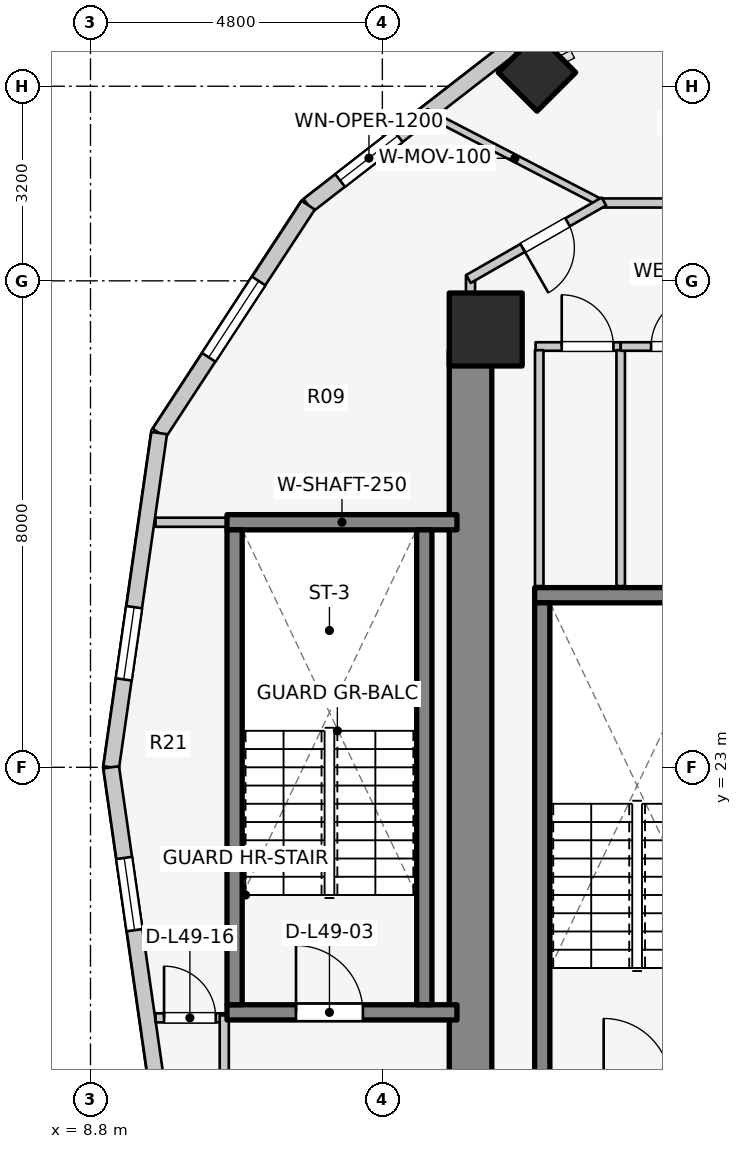
"""IFC4 building model, lengths in metres.
Left out: names, types, materials, properties, quantities, classifications, styles, units other than length and angle.
Written with IfcOpenShell. Run it as: python <this file> out.ifc"""

import sys

from ifc_helpers import new_model, si_unit, direction, frame, frame_2d, origin, origin_2d, place, context, subcontext, project, spatial, rectangle, extrude, element, fill, save


model = new_model("IFC4")
c1 = context("Model", 3, precision=1e-05, world=origin(), true_north=direction((0.0, 1.0)))
c2 = subcontext(c1, "Body", "Model", "MODEL_VIEW")
j1 = project(units=[si_unit("LENGTHUNIT", "METRE"), si_unit("PLANEANGLEUNIT", "RADIAN")], contexts=[c1])
p1 = place(None, origin())
s1 = spatial("IfcSite", under=j1, at=p1, CompositionType="ELEMENT")
p2 = place(p1, origin())
s2 = spatial("IfcBuilding", under=s1, at=p2, CompositionType="ELEMENT")
p3 = place(p2, frame((0.0, 0.0, 162.2)))
s3 = spatial("IfcBuildingStorey", under=s2, at=p3, CompositionType="ELEMENT", Elevation=162.2)
p4 = place(p3, frame((15.05, 17.05, 0.0), z_axis=(0.0, 0.0, 1.0), x_axis=(0.0, 1.0, 0.0)))
e1 = element("IfcWall", 1, at=p4, inside=s3, PredefinedType="SHEAR", context=c2, shape_type="SweptSolid", body=[
    extrude(rectangle(XDim=12.8, YDim=0.7, at=frame_2d((6.4, 0.0))), origin(), (0.0, 0.0, 1.0), 3.1),
])
p5 = place(p3, frame((16.105, 25.83, 0.0), z_axis=(0.0, 0.0, 1.0), x_axis=(1.0, 0.0, 0.0)))
e2 = element("IfcWall", 2, at=p5, inside=s3, PredefinedType="SOLIDWALL", context=c2, shape_type="SweptSolid", body=[
    extrude(rectangle(XDim=3.37, YDim=0.25, at=frame_2d((1.685, 0.0))), origin(), (0.0, 0.0, 1.0), 3.1),
])
p6 = place(p3, frame((16.23, 17.895, 0.0), z_axis=(0.0, 0.0, 1.0), x_axis=(0.0, 1.0, 0.0)))
e3 = element("IfcWall", 3, at=p6, inside=s3, PredefinedType="SOLIDWALL", context=c2, shape_type="SweptSolid", body=[
    extrude(rectangle(XDim=7.81, YDim=0.25, at=frame_2d((3.905, 0.0))), origin(), (0.0, 0.0, 1.0), 3.1),
])
p7 = place(p3, frame((11.045, 18.97, 0.0), z_axis=(0.0, 0.0, 1.0), x_axis=(1.0, 0.0, 0.0)))
e4 = element("IfcWall", 4, at=p7, inside=s3, PredefinedType="SOLIDWALL", context=c2, shape_type="SweptSolid", body=[
    extrude(rectangle(XDim=3.782, YDim=0.25, at=frame_2d((1.891, 0.0))), origin(), (0.0, 0.0, 1.0), 3.1),
])
p8 = place(p7, frame((1.135, 0.0, 0.0)))
e5 = element("IfcOpeningElement", 5, at=p8, cuts=e4, PredefinedType="OPENING", context=c2, shape_type="SweptSolid", body=[
    extrude(rectangle(XDim=1.1, YDim=2.1, at=frame_2d((0.55, 1.05))), frame((0.0, 0.135, 0.0), z_axis=(0.0, -1.0, 0.0), x_axis=(1.0, 0.0, 0.0)), (0.0, 0.0, 1.0), 0.27),
])
p9 = place(p3, frame((11.045, 27.03, 0.0), z_axis=(0.0, 0.0, 1.0), x_axis=(1.0, 0.0, 0.0)))
e6 = element("IfcWall", 6, at=p9, inside=s3, PredefinedType="SOLIDWALL", context=c2, shape_type="SweptSolid", body=[
    extrude(rectangle(XDim=3.782, YDim=0.25, at=frame_2d((1.891, 0.0))), origin(), (0.0, 0.0, 1.0), 3.1),
])
for number, where, z_axis, x_axis in (
    (7, (11.17, 19.095, 0.0), (0.0, 0.0, 1.0), (0.0, 1.0, 0.0)),
    (8, (14.29, 19.095, 0.0), (0.0, 0.0, 1.0), (0.0, 1.0, 0.0)),
):
    element("IfcWall", number, at=place(p3, frame(where, z_axis=z_axis, x_axis=x_axis)), inside=s3, PredefinedType="SOLIDWALL", context=c2, shape_type="SweptSolid", body=[
        extrude(rectangle(XDim=7.81, YDim=0.25, at=frame_2d((3.905, 0.0))), origin(), (0.0, 0.0, 1.0), 3.1),
    ])
p10 = place(p3, frame((15.3, 30.2, 0.0), z_axis=(0.0, 0.0, 1.0), x_axis=(1.0, 0.0, 0.0)))
e9 = element("IfcColumn", 9, at=p10, inside=s3, PredefinedType="COLUMN", context=c2, shape_type="SweptSolid", body=[
    extrude(rectangle(XDim=1.2, YDim=1.2, at=origin_2d()), origin(), (0.0, 0.0, 1.0), 3.1),
])
p11 = place(p3, frame((16.143, 34.427, 0.0), z_axis=(0.0, 0.0, 1.0), x_axis=(-0.707106781187, 0.707106781187, 0.0)))
e10 = element("IfcColumn", 10, at=p11, inside=s3, PredefinedType="COLUMN", context=c2, shape_type="SweptSolid", body=[
    extrude(rectangle(XDim=0.9, YDim=0.9, at=origin_2d()), origin(), (0.0, 0.0, 1.0), 3.1),
])
p12 = place(p3, frame((19.587, 36.863, 0.0), z_axis=(0.0, 0.0, 1.0), x_axis=(-0.885660265226, -0.464333818065, 0.0)))
e11 = element("IfcWall", 11, at=p12, inside=s3, PredefinedType="STANDARD", context=c2, shape_type="SweptSolid", body=[
    extrude(rectangle(XDim=4.354, YDim=0.26, at=frame_2d((2.177, 0.0))), origin(), (0.0, 0.0, 1.0), 2.85),
])
p13 = place(p3, frame((15.731, 34.842, 0.0), z_axis=(0.0, 0.0, 1.0), x_axis=(-0.790185650662, -0.612867552973, 0.0)))
e12 = element("IfcWall", 12, at=p13, inside=s3, PredefinedType="STANDARD", context=c2, shape_type="SweptSolid", body=[
    extrude(rectangle(XDim=4.239, YDim=0.26, at=frame_2d((2.12, 0.0))), origin(), (0.0, 0.0, 1.0), 2.85),
])
p14 = place(p13, frame((2.375, 0.0, 0.75)))
e13 = element("IfcOpeningElement", 13, at=p14, cuts=e12, PredefinedType="OPENING", context=c2, shape_type="SweptSolid", body=[
    extrude(rectangle(XDim=1.2, YDim=1.5, at=frame_2d((0.6, 0.75))), frame((0.0, 0.14, 0.0), z_axis=(0.0, -1.0, 0.0), x_axis=(1.0, 0.0, 0.0)), (0.0, 0.0, 1.0), 0.28),
])
p15 = place(p3, frame((12.381, 32.243, 0.0), z_axis=(0.0, 0.0, 1.0), x_axis=(-0.547456494366, -0.836834145322, 0.0)))
e14 = element("IfcWall", 14, at=p15, inside=s3, PredefinedType="STANDARD", context=c2, shape_type="SweptSolid", body=[
    extrude(rectangle(XDim=4.477, YDim=0.26, at=frame_2d((2.239, 0.0))), origin(), (0.0, 0.0, 1.0), 2.85),
])
p16 = place(p15, frame((1.489, 0.0, 0.75)))
e15 = element("IfcOpeningElement", 15, at=p16, cuts=e14, PredefinedType="OPENING", context=c2, shape_type="SweptSolid", body=[
    extrude(rectangle(XDim=1.5, YDim=1.6, at=frame_2d((0.75, 0.8))), frame((0.0, 0.14, 0.0), z_axis=(0.0, -1.0, 0.0), x_axis=(1.0, 0.0, 0.0)), (0.0, 0.0, 1.0), 0.28),
])
p17 = place(p3, frame((9.93, 28.497, 0.0), z_axis=(0.0, 0.0, 1.0), x_axis=(-0.142227632286, -0.989833976288, 0.0)))
e16 = element("IfcWall", 16, at=p17, inside=s3, PredefinedType="STANDARD", context=c2, shape_type="SweptSolid", body=[
    extrude(rectangle(XDim=5.553, YDim=0.26, at=frame_2d((2.776, 0.0))), origin(), (0.0, 0.0, 1.0), 2.85),
])
p18 = place(p17, frame((2.892, 0.0, 0.75)))
e17 = element("IfcOpeningElement", 17, at=p18, cuts=e16, PredefinedType="OPENING", context=c2, shape_type="SweptSolid", body=[
    extrude(rectangle(XDim=1.2, YDim=1.5, at=frame_2d((0.6, 0.75))), frame((0.0, 0.14, 0.0), z_axis=(0.0, -1.0, 0.0), x_axis=(1.0, 0.0, 0.0)), (0.0, 0.0, 1.0), 0.28),
])
p19 = place(p3, frame((9.14, 23.0, 0.0), z_axis=(0.0, 0.0, 1.0), x_axis=(0.142227632286, -0.989833976288, 0.0)))
e18 = element("IfcWall", 18, at=p19, inside=s3, PredefinedType="STANDARD", context=c2, shape_type="SweptSolid", body=[
    extrude(rectangle(XDim=5.553, YDim=0.26, at=frame_2d((2.776, 0.0))), origin(), (0.0, 0.0, 1.0), 2.85),
])
p20 = place(p19, frame((1.506, 0.0, 0.75)))
e19 = element("IfcOpeningElement", 19, at=p20, cuts=e18, PredefinedType="OPENING", context=c2, shape_type="SweptSolid", body=[
    extrude(rectangle(XDim=1.2, YDim=1.5, at=frame_2d((0.6, 0.75))), frame((0.0, 0.14, 0.0), z_axis=(0.0, -1.0, 0.0), x_axis=(1.0, 0.0, 0.0)), (0.0, 0.0, 1.0), 0.28),
])
p21 = place(p3, frame((16.12, 29.92, 0.0), z_axis=(0.0, 0.0, 1.0), x_axis=(1.0, 0.0, 0.0)))
e20 = element("IfcWall", 20, at=p21, inside=s3, PredefinedType="PLUMBINGWALL", context=c2, shape_type="SweptSolid", body=[
    extrude(rectangle(XDim=1.4, YDim=0.14, at=frame_2d((0.7, 0.0))), origin(), (0.0, 0.0, 1.0), 2.855),
])
p22 = place(p21, frame((0.43, 0.0, 0.0)))
e21 = element("IfcOpeningElement", 21, at=p22, cuts=e20, PredefinedType="OPENING", context=c2, shape_type="SweptSolid", body=[
    extrude(rectangle(XDim=0.85, YDim=2.05, at=frame_2d((0.425, 1.025))), frame((0.0, 0.08, 0.0), z_axis=(0.0, -1.0, 0.0), x_axis=(1.0, 0.0, 0.0)), (0.0, 0.0, 1.0), 0.16),
])
for number, where, z_axis, x_axis in (
    (22, (16.18, 25.98, 0.0), (0.0, 0.0, 1.0), (0.0, 1.0, 0.0)),
    (23, (17.52, 25.98, 0.0), (0.0, 0.0, 1.0), (0.0, 1.0, 0.0)),
):
    element("IfcWall", number, at=place(p3, frame(where, z_axis=z_axis, x_axis=x_axis)), inside=s3, PredefinedType="PLUMBINGWALL", context=c2, shape_type="SweptSolid", body=[
        extrude(rectangle(XDim=3.88, YDim=0.14, at=frame_2d((1.94, 0.0))), origin(), (0.0, 0.0, 1.0), 2.855),
    ])
p23 = place(p3, frame((17.52, 29.92, 0.0), z_axis=(0.0, 0.0, 1.0), x_axis=(1.0, 0.0, 0.0)))
e24 = element("IfcWall", 24, at=p23, inside=s3, PredefinedType="PLUMBINGWALL", context=c2, shape_type="SweptSolid", body=[
    extrude(rectangle(XDim=1.9, YDim=0.14, at=frame_2d((0.95, 0.0))), origin(), (0.0, 0.0, 1.0), 2.855),
])
p24 = place(p23, frame((0.5, 0.0, 0.0)))
e25 = element("IfcOpeningElement", 25, at=p24, cuts=e24, PredefinedType="OPENING", context=c2, shape_type="SweptSolid", body=[
    extrude(rectangle(XDim=0.85, YDim=2.05, at=frame_2d((0.425, 1.025))), frame((0.0, 0.08, 0.0), z_axis=(0.0, -1.0, 0.0), x_axis=(1.0, 0.0, 0.0)), (0.0, 0.0, 1.0), 0.16),
])
p25 = place(p3, frame((9.87, 27.03, 0.0), z_axis=(0.0, 0.0, 1.0), x_axis=(1.0, 0.0, 0.0)))
e26 = element("IfcWall", 26, at=p25, inside=s3, PredefinedType="PARTITIONING", context=c2, shape_type="SweptSolid", body=[
    extrude(rectangle(XDim=1.17, YDim=0.15, at=frame_2d((0.585, 0.0))), origin(), (0.0, 0.0, 1.0), 2.855),
])
p26 = place(p3, frame((15.05, 29.8, 0.0), z_axis=(0.0, 0.0, 1.0), x_axis=(0.0, 1.0, 0.0)))
e27 = element("IfcWall", 27, at=p26, inside=s3, PredefinedType="PARTITIONING", context=c2, shape_type="SweptSolid", body=[
    extrude(rectangle(XDim=1.29, YDim=0.15, at=frame_2d((0.645, 0.0))), origin(), (0.0, 0.0, 1.0), 2.855),
])
p27 = place(p3, frame((17.244, 32.257, 0.0), z_axis=(0.0, 0.0, 1.0), x_axis=(-0.888000886587, 0.459841739537, 0.0)))
e28 = element("IfcWall", 28, at=p27, inside=s3, PredefinedType="MOVABLE", context=c2, shape_type="SweptSolid", body=[
    extrude(rectangle(XDim=3.298, YDim=0.12, at=frame_2d((1.649, 0.0))), origin(), (0.0, 0.0, 1.0), 2.22),
])
p28 = place(p3, frame((17.15, 32.28, 0.0), z_axis=(0.0, 0.0, 1.0), x_axis=(1.0, 0.0, 0.0)))
e29 = element("IfcWall", 29, at=p28, inside=s3, PredefinedType="PARTITIONING", context=c2, shape_type="SweptSolid", body=[
    extrude(rectangle(XDim=7.52, YDim=0.15, at=frame_2d((3.76, 0.0))), origin(), (0.0, 0.0, 1.0), 2.299),
])
p29 = place(p28, frame((1.3, 0.0, 0.0)))
e30 = element("IfcOpeningElement", 30, at=p29, cuts=e29, PredefinedType="OPENING", context=c2, shape_type="SweptSolid", body=[
    extrude(rectangle(XDim=0.9, YDim=2.1, at=frame_2d((0.45, 1.05))), frame((0.0, 0.085, 0.0), z_axis=(0.0, -1.0, 0.0), x_axis=(1.0, 0.0, 0.0)), (0.0, 0.0, 1.0), 0.17),
])
p30 = place(p3, frame((17.243, 32.305, 0.0), z_axis=(0.0, 0.0, 1.0), x_axis=(-0.867991349648, -0.496579315857, 0.0)))
e31 = element("IfcWall", 31, at=p30, inside=s3, PredefinedType="PARTITIONING", context=c2, shape_type="SweptSolid", body=[
    extrude(rectangle(XDim=2.567, YDim=0.15, at=frame_2d((1.283, 0.0))), origin(), (0.0, 0.0, 1.0), 2.22),
])
p31 = place(p30, frame((0.688, 0.0, 0.0)))
e32 = element("IfcOpeningElement", 32, at=p31, cuts=e31, PredefinedType="OPENING", context=c2, shape_type="SweptSolid", body=[
    extrude(rectangle(XDim=0.85, YDim=2.05, at=frame_2d((0.425, 1.025))), frame((0.0, 0.085, 0.0), z_axis=(0.0, -1.0, 0.0), x_axis=(1.0, 0.0, 0.0)), (0.0, 0.0, 1.0), 0.17),
])
p32 = place(p3, frame((9.87, 18.88, 0.0), z_axis=(0.0, 0.0, 1.0), x_axis=(1.0, 0.0, 0.0)))
e33 = element("IfcWall", 33, at=p32, inside=s3, PredefinedType="PARTITIONING", context=c2, shape_type="SweptSolid", body=[
    extrude(rectangle(XDim=1.17, YDim=0.15, at=frame_2d((0.585, 0.0))), origin(), (0.0, 0.0, 1.0), 2.855),
])
p33 = place(p32, frame((0.14, 0.0, 0.0)))
e34 = element("IfcOpeningElement", 34, at=p33, cuts=e33, PredefinedType="OPENING", context=c2, shape_type="SweptSolid", body=[
    extrude(rectangle(XDim=0.85, YDim=2.05, at=frame_2d((0.425, 1.025))), frame((0.0, 0.085, 0.0), z_axis=(0.0, -1.0, 0.0), x_axis=(1.0, 0.0, 0.0)), (0.0, 0.0, 1.0), 0.17),
])
p34 = place(p3, frame((11.0, 15.91, 0.0), z_axis=(0.0, 0.0, 1.0), x_axis=(0.0, 1.0, 0.0)))
e35 = element("IfcWall", 35, at=p34, inside=s3, PredefinedType="PARTITIONING", context=c2, shape_type="SweptSolid", body=[
    extrude(rectangle(XDim=3.01, YDim=0.15, at=frame_2d((1.505, 0.0))), origin(), (0.0, 0.0, 1.0), 2.855),
])
p35 = place(p14, origin())
e36 = element("IfcWindow", 36, at=p35, inside=s3, PartitioningType="SINGLE_PANEL", PredefinedType="WINDOW", context=c2, shape_type="SweptSolid", body=[
    extrude(rectangle(XDim=1.2, YDim=1.5, at=frame_2d((0.6, 0.75))), frame((0.0, 0.03, 0.0), z_axis=(0.0, -1.0, 0.0), x_axis=(1.0, 0.0, 0.0)), (0.0, 0.0, 1.0), 0.06),
])
fill(e13, e36)
p36 = place(p16, origin())
e37 = element("IfcWindow", 37, at=p36, inside=s3, PartitioningType="SINGLE_PANEL", PredefinedType="WINDOW", context=c2, shape_type="SweptSolid", body=[
    extrude(rectangle(XDim=1.5, YDim=1.6, at=frame_2d((0.75, 0.8))), frame((0.0, 0.03, 0.0), z_axis=(0.0, -1.0, 0.0), x_axis=(1.0, 0.0, 0.0)), (0.0, 0.0, 1.0), 0.06),
])
fill(e15, e37)
p37 = place(p18, origin())
e38 = element("IfcWindow", 38, at=p37, inside=s3, PartitioningType="SINGLE_PANEL", PredefinedType="WINDOW", context=c2, shape_type="SweptSolid", body=[
    extrude(rectangle(XDim=1.2, YDim=1.5, at=frame_2d((0.6, 0.75))), frame((0.0, 0.03, 0.0), z_axis=(0.0, -1.0, 0.0), x_axis=(1.0, 0.0, 0.0)), (0.0, 0.0, 1.0), 0.06),
])
fill(e17, e38)
p38 = place(p20, origin())
e39 = element("IfcWindow", 39, at=p38, inside=s3, PartitioningType="SINGLE_PANEL", PredefinedType="WINDOW", context=c2, shape_type="SweptSolid", body=[
    extrude(rectangle(XDim=1.2, YDim=1.5, at=frame_2d((0.6, 0.75))), frame((0.0, 0.03, 0.0), z_axis=(0.0, -1.0, 0.0), x_axis=(1.0, 0.0, 0.0)), (0.0, 0.0, 1.0), 0.06),
])
fill(e19, e39)
p39 = place(p8, origin())
e40 = element("IfcDoor", 40, at=p39, inside=s3, OperationType="SINGLE_SWING_LEFT", PredefinedType="DOOR", context=c2, shape_type="SweptSolid", body=[
    extrude(rectangle(XDim=1.1, YDim=2.1, at=frame_2d((0.55, 1.05))), frame((0.0, 0.025, 0.0), z_axis=(0.0, -1.0, 0.0), x_axis=(1.0, 0.0, 0.0)), (0.0, 0.0, 1.0), 0.05),
])
fill(e5, e40)
p40 = place(p22, origin())
e41 = element("IfcDoor", 41, at=p40, inside=s3, OperationType="SINGLE_SWING_LEFT", PredefinedType="DOOR", context=c2, shape_type="SweptSolid", body=[
    extrude(rectangle(XDim=0.85, YDim=2.05, at=frame_2d((0.425, 1.025))), frame((0.0, 0.025, 0.0), z_axis=(0.0, -1.0, 0.0), x_axis=(1.0, 0.0, 0.0)), (0.0, 0.0, 1.0), 0.05),
])
fill(e21, e41)
p41 = place(p24, origin())
e42 = element("IfcDoor", 42, at=p41, inside=s3, OperationType="SINGLE_SWING_RIGHT", PredefinedType="DOOR", context=c2, shape_type="SweptSolid", body=[
    extrude(rectangle(XDim=0.85, YDim=2.05, at=frame_2d((0.425, 1.025))), frame((0.0, 0.025, 0.0), z_axis=(0.0, -1.0, 0.0), x_axis=(1.0, 0.0, 0.0)), (0.0, 0.0, 1.0), 0.05),
])
fill(e25, e42)
p42 = place(p31, origin())
e43 = element("IfcDoor", 43, at=p42, inside=s3, OperationType="SINGLE_SWING_RIGHT", PredefinedType="DOOR", context=c2, shape_type="SweptSolid", body=[
    extrude(rectangle(XDim=0.85, YDim=2.05, at=frame_2d((0.425, 1.025))), frame((0.0, 0.025, 0.0), z_axis=(0.0, -1.0, 0.0), x_axis=(1.0, 0.0, 0.0)), (0.0, 0.0, 1.0), 0.05),
])
fill(e32, e43)
p43 = place(p33, origin())
e44 = element("IfcDoor", 44, at=p43, inside=s3, OperationType="SINGLE_SWING_LEFT", PredefinedType="DOOR", context=c2, shape_type="SweptSolid", body=[
    extrude(rectangle(XDim=0.85, YDim=2.05, at=frame_2d((0.425, 1.025))), frame((0.0, 0.025, 0.0), z_axis=(0.0, -1.0, 0.0), x_axis=(1.0, 0.0, 0.0)), (0.0, 0.0, 1.0), 0.05),
])
fill(e34, e44)
save(model, sys.argv[1])
